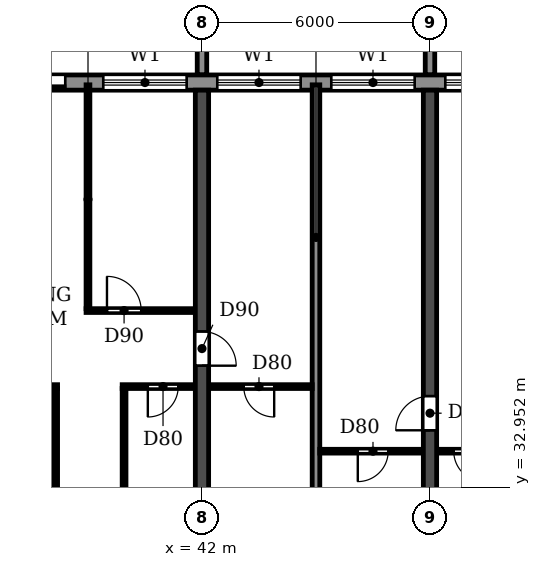
"""IFC4 building model, lengths in metres.
Left out: names, types, materials, properties, quantities, classifications, styles, units other than length and angle.
Written with IfcOpenShell. Run it as: python <this file> out.ifc"""

import sys

from ifc_helpers import new_model, si_unit, direction, frame, frame_2d, origin, place, context, subcontext, project, spatial, polyline, rectangle, outline, extrude, source, transform, mapped, element, fill, save


model = new_model("IFC4")
c1 = context("Model", 3, precision=1e-05, world=origin(), true_north=direction((0.0, 1.0)))
c2 = subcontext(c1, "Body", "Model", "MODEL_VIEW")
j1 = project(units=[si_unit("LENGTHUNIT", "METRE"), si_unit("PLANEANGLEUNIT", "RADIAN")], contexts=[c1])
p1 = place(None, origin())
s1 = spatial("IfcSite", under=j1, at=p1, CompositionType="ELEMENT")
p2 = place(p1, origin())
s2 = spatial("IfcBuilding", under=s1, at=p2, CompositionType="ELEMENT")
p3 = place(p2, frame((0.0, 0.0, 92.7)))
s3 = spatial("IfcBuildingStorey", under=s2, at=p3, CompositionType="ELEMENT", Elevation=92.7)
p4 = place(p3, frame((42.0, 30.525, 0.0), z_axis=(0.0, 0.0, 1.0), x_axis=(0.0, 1.0, 0.0)))
e1 = element("IfcWall", 1, at=p4, inside=s3, PredefinedType="SHEAR", context=c2, shape_type="SweptSolid", body=[
    extrude(rectangle(XDim=12.875, YDim=0.35, at=frame_2d((6.438, 0.0))), origin(), (0.0, 0.0, 1.0), 3.06),
])
p5 = place(p4, frame((5.625, 0.0, 0.0)))
e2 = element("IfcOpeningElement", 2, at=p5, cuts=e1, PredefinedType="OPENING", context=c2, shape_type="SweptSolid", body=[
    extrude(rectangle(XDim=0.9, YDim=2.1, at=frame_2d((0.45, 1.05))), frame((0.0, 0.185, 0.0), z_axis=(0.0, -1.0, 0.0), x_axis=(1.0, 0.0, 0.0)), (0.0, 0.0, 1.0), 0.37),
])
p6 = place(p3, frame((48.0, 30.525, 0.0), z_axis=(0.0, 0.0, 1.0), x_axis=(0.0, 1.0, 0.0)))
e3 = element("IfcWall", 3, at=p6, inside=s3, PredefinedType="SHEAR", context=c2, shape_type="SweptSolid", body=[
    extrude(rectangle(XDim=12.875, YDim=0.35, at=frame_2d((6.438, 0.0))), origin(), (0.0, 0.0, 1.0), 3.06),
])
p7 = place(p6, frame((3.925, 0.0, 0.0)))
e4 = element("IfcOpeningElement", 4, at=p7, cuts=e3, PredefinedType="OPENING", context=c2, shape_type="SweptSolid", body=[
    extrude(rectangle(XDim=0.9, YDim=2.1, at=frame_2d((0.45, 1.05))), frame((0.0, 0.185, 0.0), z_axis=(0.0, -1.0, 0.0), x_axis=(1.0, 0.0, 0.0)), (0.0, 0.0, 1.0), 0.37),
])
p8 = place(p3, frame((91.317, 43.6, 0.0), z_axis=(0.0, 0.0, 1.0), x_axis=(-1.0, 0.0, 0.0)))
e5 = element("IfcWall", 5, at=p8, inside=s3, PredefinedType="STANDARD", context=c2, shape_type="SweptSolid", body=[
    extrude(rectangle(XDim=80.634, YDim=0.4, at=frame_2d((40.317, 0.0))), origin(), (0.0, 0.0, 1.0), 3.06),
])
p9 = place(p8, frame((76.717, 0.0, 0.9)))
e6 = element("IfcOpeningElement", 6, at=p9, cuts=e5, PredefinedType="OPENING", context=c2, shape_type="SweptSolid", body=[
    extrude(rectangle(XDim=2.2, YDim=1.5, at=frame_2d((1.1, 0.75))), frame((0.0, 0.21, 0.0), z_axis=(0.0, -1.0, 0.0), x_axis=(1.0, 0.0, 0.0)), (0.0, 0.0, 1.0), 0.42),
])
p10 = place(p8, frame((73.917, 0.0, 0.0)))
e7 = element("IfcOpeningElement", 7, at=p10, cuts=e5, PredefinedType="OPENING", context=c2, shape_type="SweptSolid", body=[
    extrude(rectangle(XDim=1.8, YDim=2.4, at=frame_2d((0.9, 1.2))), frame((0.0, 0.21, 0.0), z_axis=(0.0, -1.0, 0.0), x_axis=(1.0, 0.0, 0.0)), (0.0, 0.0, 1.0), 0.42),
])
p11 = place(p8, frame((70.717, 0.0, 0.9)))
e8 = element("IfcOpeningElement", 8, at=p11, cuts=e5, PredefinedType="OPENING", context=c2, shape_type="SweptSolid", body=[
    extrude(rectangle(XDim=2.2, YDim=1.5, at=frame_2d((1.1, 0.75))), frame((0.0, 0.21, 0.0), z_axis=(0.0, -1.0, 0.0), x_axis=(1.0, 0.0, 0.0)), (0.0, 0.0, 1.0), 0.42),
])
p12 = place(p8, frame((67.717, 0.0, 0.9)))
e9 = element("IfcOpeningElement", 9, at=p12, cuts=e5, PredefinedType="OPENING", context=c2, shape_type="SweptSolid", body=[
    extrude(rectangle(XDim=2.2, YDim=1.5, at=frame_2d((1.1, 0.75))), frame((0.0, 0.21, 0.0), z_axis=(0.0, -1.0, 0.0), x_axis=(1.0, 0.0, 0.0)), (0.0, 0.0, 1.0), 0.42),
])
p13 = place(p8, frame((64.717, 0.0, 0.9)))
e10 = element("IfcOpeningElement", 10, at=p13, cuts=e5, PredefinedType="OPENING", context=c2, shape_type="SweptSolid", body=[
    extrude(rectangle(XDim=2.2, YDim=1.5, at=frame_2d((1.1, 0.75))), frame((0.0, 0.21, 0.0), z_axis=(0.0, -1.0, 0.0), x_axis=(1.0, 0.0, 0.0)), (0.0, 0.0, 1.0), 0.42),
])
p14 = place(p8, frame((61.917, 0.0, 0.0)))
e11 = element("IfcOpeningElement", 11, at=p14, cuts=e5, PredefinedType="OPENING", context=c2, shape_type="SweptSolid", body=[
    extrude(rectangle(XDim=1.8, YDim=2.4, at=frame_2d((0.9, 1.2))), frame((0.0, 0.21, 0.0), z_axis=(0.0, -1.0, 0.0), x_axis=(1.0, 0.0, 0.0)), (0.0, 0.0, 1.0), 0.42),
])
p15 = place(p8, frame((58.717, 0.0, 0.9)))
e12 = element("IfcOpeningElement", 12, at=p15, cuts=e5, PredefinedType="OPENING", context=c2, shape_type="SweptSolid", body=[
    extrude(rectangle(XDim=2.2, YDim=1.5, at=frame_2d((1.1, 0.75))), frame((0.0, 0.21, 0.0), z_axis=(0.0, -1.0, 0.0), x_axis=(1.0, 0.0, 0.0)), (0.0, 0.0, 1.0), 0.42),
])
p16 = place(p8, frame((55.717, 0.0, 0.9)))
e13 = element("IfcOpeningElement", 13, at=p16, cuts=e5, PredefinedType="OPENING", context=c2, shape_type="SweptSolid", body=[
    extrude(rectangle(XDim=2.2, YDim=1.5, at=frame_2d((1.1, 0.75))), frame((0.0, 0.21, 0.0), z_axis=(0.0, -1.0, 0.0), x_axis=(1.0, 0.0, 0.0)), (0.0, 0.0, 1.0), 0.42),
])
p17 = place(p8, frame((52.917, 0.0, 0.0)))
e14 = element("IfcOpeningElement", 14, at=p17, cuts=e5, PredefinedType="OPENING", context=c2, shape_type="SweptSolid", body=[
    extrude(rectangle(XDim=1.8, YDim=2.4, at=frame_2d((0.9, 1.2))), frame((0.0, 0.21, 0.0), z_axis=(0.0, -1.0, 0.0), x_axis=(1.0, 0.0, 0.0)), (0.0, 0.0, 1.0), 0.42),
])
p18 = place(p8, frame((49.717, 0.0, 0.9)))
e15 = element("IfcOpeningElement", 15, at=p18, cuts=e5, PredefinedType="OPENING", context=c2, shape_type="SweptSolid", body=[
    extrude(rectangle(XDim=2.2, YDim=1.5, at=frame_2d((1.1, 0.75))), frame((0.0, 0.21, 0.0), z_axis=(0.0, -1.0, 0.0), x_axis=(1.0, 0.0, 0.0)), (0.0, 0.0, 1.0), 0.42),
])
p19 = place(p8, frame((46.717, 0.0, 0.9)))
e16 = element("IfcOpeningElement", 16, at=p19, cuts=e5, PredefinedType="OPENING", context=c2, shape_type="SweptSolid", body=[
    extrude(rectangle(XDim=2.2, YDim=1.5, at=frame_2d((1.1, 0.75))), frame((0.0, 0.21, 0.0), z_axis=(0.0, -1.0, 0.0), x_axis=(1.0, 0.0, 0.0)), (0.0, 0.0, 1.0), 0.42),
])
p20 = place(p8, frame((43.717, 0.0, 0.9)))
e17 = element("IfcOpeningElement", 17, at=p20, cuts=e5, PredefinedType="OPENING", context=c2, shape_type="SweptSolid", body=[
    extrude(rectangle(XDim=2.2, YDim=1.5, at=frame_2d((1.1, 0.75))), frame((0.0, 0.21, 0.0), z_axis=(0.0, -1.0, 0.0), x_axis=(1.0, 0.0, 0.0)), (0.0, 0.0, 1.0), 0.42),
])
p21 = place(p8, frame((40.717, 0.0, 0.9)))
e18 = element("IfcOpeningElement", 18, at=p21, cuts=e5, PredefinedType="OPENING", context=c2, shape_type="SweptSolid", body=[
    extrude(rectangle(XDim=2.2, YDim=1.5, at=frame_2d((1.1, 0.75))), frame((0.0, 0.21, 0.0), z_axis=(0.0, -1.0, 0.0), x_axis=(1.0, 0.0, 0.0)), (0.0, 0.0, 1.0), 0.42),
])
p22 = place(p8, frame((37.917, 0.0, 0.0)))
e19 = element("IfcOpeningElement", 19, at=p22, cuts=e5, PredefinedType="OPENING", context=c2, shape_type="SweptSolid", body=[
    extrude(rectangle(XDim=1.8, YDim=2.4, at=frame_2d((0.9, 1.2))), frame((0.0, 0.21, 0.0), z_axis=(0.0, -1.0, 0.0), x_axis=(1.0, 0.0, 0.0)), (0.0, 0.0, 1.0), 0.42),
])
p23 = place(p8, frame((34.917, 0.0, 0.0)))
e20 = element("IfcOpeningElement", 20, at=p23, cuts=e5, PredefinedType="OPENING", context=c2, shape_type="SweptSolid", body=[
    extrude(rectangle(XDim=1.8, YDim=2.4, at=frame_2d((0.9, 1.2))), frame((0.0, 0.21, 0.0), z_axis=(0.0, -1.0, 0.0), x_axis=(1.0, 0.0, 0.0)), (0.0, 0.0, 1.0), 0.42),
])
p24 = place(p8, frame((31.717, 0.0, 0.9)))
e21 = element("IfcOpeningElement", 21, at=p24, cuts=e5, PredefinedType="OPENING", context=c2, shape_type="SweptSolid", body=[
    extrude(rectangle(XDim=2.2, YDim=1.5, at=frame_2d((1.1, 0.75))), frame((0.0, 0.21, 0.0), z_axis=(0.0, -1.0, 0.0), x_axis=(1.0, 0.0, 0.0)), (0.0, 0.0, 1.0), 0.42),
])
p25 = place(p8, frame((28.717, 0.0, 0.9)))
e22 = element("IfcOpeningElement", 22, at=p25, cuts=e5, PredefinedType="OPENING", context=c2, shape_type="SweptSolid", body=[
    extrude(rectangle(XDim=2.2, YDim=1.5, at=frame_2d((1.1, 0.75))), frame((0.0, 0.21, 0.0), z_axis=(0.0, -1.0, 0.0), x_axis=(1.0, 0.0, 0.0)), (0.0, 0.0, 1.0), 0.42),
])
p26 = place(p8, frame((25.717, 0.0, 0.9)))
e23 = element("IfcOpeningElement", 23, at=p26, cuts=e5, PredefinedType="OPENING", context=c2, shape_type="SweptSolid", body=[
    extrude(rectangle(XDim=2.2, YDim=1.5, at=frame_2d((1.1, 0.75))), frame((0.0, 0.21, 0.0), z_axis=(0.0, -1.0, 0.0), x_axis=(1.0, 0.0, 0.0)), (0.0, 0.0, 1.0), 0.42),
])
p27 = place(p8, frame((22.717, 0.0, 0.9)))
e24 = element("IfcOpeningElement", 24, at=p27, cuts=e5, PredefinedType="OPENING", context=c2, shape_type="SweptSolid", body=[
    extrude(rectangle(XDim=2.2, YDim=1.5, at=frame_2d((1.1, 0.75))), frame((0.0, 0.21, 0.0), z_axis=(0.0, -1.0, 0.0), x_axis=(1.0, 0.0, 0.0)), (0.0, 0.0, 1.0), 0.42),
])
p28 = place(p8, frame((19.917, 0.0, 0.0)))
e25 = element("IfcOpeningElement", 25, at=p28, cuts=e5, PredefinedType="OPENING", context=c2, shape_type="SweptSolid", body=[
    extrude(rectangle(XDim=1.8, YDim=2.4, at=frame_2d((0.9, 1.2))), frame((0.0, 0.21, 0.0), z_axis=(0.0, -1.0, 0.0), x_axis=(1.0, 0.0, 0.0)), (0.0, 0.0, 1.0), 0.42),
])
p29 = place(p8, frame((16.717, 0.0, 0.9)))
e26 = element("IfcOpeningElement", 26, at=p29, cuts=e5, PredefinedType="OPENING", context=c2, shape_type="SweptSolid", body=[
    extrude(rectangle(XDim=2.2, YDim=1.5, at=frame_2d((1.1, 0.75))), frame((0.0, 0.21, 0.0), z_axis=(0.0, -1.0, 0.0), x_axis=(1.0, 0.0, 0.0)), (0.0, 0.0, 1.0), 0.42),
])
p30 = place(p8, frame((13.917, 0.0, 0.0)))
e27 = element("IfcOpeningElement", 27, at=p30, cuts=e5, PredefinedType="OPENING", context=c2, shape_type="SweptSolid", body=[
    extrude(rectangle(XDim=1.8, YDim=2.4, at=frame_2d((0.9, 1.2))), frame((0.0, 0.21, 0.0), z_axis=(0.0, -1.0, 0.0), x_axis=(1.0, 0.0, 0.0)), (0.0, 0.0, 1.0), 0.42),
])
p31 = place(p8, frame((10.717, 0.0, 0.9)))
e28 = element("IfcOpeningElement", 28, at=p31, cuts=e5, PredefinedType="OPENING", context=c2, shape_type="SweptSolid", body=[
    extrude(rectangle(XDim=2.2, YDim=1.5, at=frame_2d((1.1, 0.75))), frame((0.0, 0.21, 0.0), z_axis=(0.0, -1.0, 0.0), x_axis=(1.0, 0.0, 0.0)), (0.0, 0.0, 1.0), 0.42),
])
p32 = place(p8, frame((7.917, 0.0, 0.0)))
e29 = element("IfcOpeningElement", 29, at=p32, cuts=e5, PredefinedType="OPENING", context=c2, shape_type="SweptSolid", body=[
    extrude(rectangle(XDim=1.8, YDim=2.4, at=frame_2d((0.9, 1.2))), frame((0.0, 0.21, 0.0), z_axis=(0.0, -1.0, 0.0), x_axis=(1.0, 0.0, 0.0)), (0.0, 0.0, 1.0), 0.42),
])
p33 = place(p8, frame((4.717, 0.0, 0.9)))
e30 = element("IfcOpeningElement", 30, at=p33, cuts=e5, PredefinedType="OPENING", context=c2, shape_type="SweptSolid", body=[
    extrude(rectangle(XDim=2.2, YDim=1.5, at=frame_2d((1.1, 0.75))), frame((0.0, 0.21, 0.0), z_axis=(0.0, -1.0, 0.0), x_axis=(1.0, 0.0, 0.0)), (0.0, 0.0, 1.0), 0.42),
])
p34 = place(p8, frame((1.917, 0.0, 0.0)))
e31 = element("IfcOpeningElement", 31, at=p34, cuts=e5, PredefinedType="OPENING", context=c2, shape_type="SweptSolid", body=[
    extrude(rectangle(XDim=1.8, YDim=2.4, at=frame_2d((0.9, 1.2))), frame((0.0, 0.21, 0.0), z_axis=(0.0, -1.0, 0.0), x_axis=(1.0, 0.0, 0.0)), (0.0, 0.0, 1.0), 0.42),
])
m1 = source(origin(), c2, "Body", "SweptSolid", [
    extrude(outline(polyline([(0.0, 0.0), (0.25, 0.0), (0.25, 3.1), (0.0, 3.1), (0.0, 0.0)])), origin(), (0.0, 0.0, 1.0), 3.1),
])
for number, where in (
    (32, (41.875, 43.8, 0.0)),
    (33, (47.875, 43.8, 0.0)),
):
    element("IfcWall", number, at=place(p3, frame(where)), inside=s3, PredefinedType="STANDARD", context=c2, shape_type="MappedRepresentation", body=[
        mapped(m1, transform((0.0, 0.0, 0.0))),
    ])
p35 = place(p3, frame((45.0, 30.535, 0.0), z_axis=(0.0, 0.0, 1.0), x_axis=(0.0, 1.0, 0.0)))
e34 = element("IfcWall", 34, at=p35, inside=s3, PredefinedType="PARTITIONING", context=c2, shape_type="SweptSolid", body=[
    extrude(rectangle(XDim=13.005, YDim=0.2, at=frame_2d((6.502, 0.0))), origin(), (0.0, 0.0, 1.0), 3.06),
])
p36 = place(p3, frame((45.1, 33.9, 0.0), z_axis=(0.0, 0.0, 1.0), x_axis=(1.0, 0.0, 0.0)))
e35 = element("IfcWall", 35, at=p36, inside=s3, PredefinedType="PARTITIONING", context=c2, shape_type="SweptSolid", body=[
    extrude(rectangle(XDim=2.715, YDim=0.1, at=frame_2d((1.357, 0.0))), origin(), (0.0, 0.0, 1.0), 3.06),
])
p37 = place(p36, frame((1.0, 0.0, 0.0)))
e36 = element("IfcOpeningElement", 36, at=p37, cuts=e35, PredefinedType="OPENING", context=c2, shape_type="SweptSolid", body=[
    extrude(rectangle(XDim=0.8, YDim=2.1, at=frame_2d((0.4, 1.05))), frame((0.0, 0.06, 0.0), z_axis=(0.0, -1.0, 0.0), x_axis=(1.0, 0.0, 0.0)), (0.0, 0.0, 1.0), 0.12),
])
p38 = place(p3, frame((48.185, 33.9, 0.0), z_axis=(0.0, 0.0, 1.0), x_axis=(1.0, 0.0, 0.0)))
e37 = element("IfcWall", 37, at=p38, inside=s3, PredefinedType="PARTITIONING", context=c2, shape_type="SweptSolid", body=[
    extrude(rectangle(XDim=1.915, YDim=0.1, at=frame_2d((0.958, 0.0))), origin(), (0.0, 0.0, 1.0), 3.06),
])
p39 = place(p38, frame((0.44, 0.0, 0.0)))
e38 = element("IfcOpeningElement", 38, at=p39, cuts=e37, PredefinedType="OPENING", context=c2, shape_type="SweptSolid", body=[
    extrude(rectangle(XDim=0.8, YDim=2.1, at=frame_2d((0.4, 1.05))), frame((0.0, 0.06, 0.0), z_axis=(0.0, -1.0, 0.0), x_axis=(1.0, 0.0, 0.0)), (0.0, 0.0, 1.0), 0.12),
])
p40 = place(p3, frame((36.185, 35.6, 0.0), z_axis=(0.0, 0.0, 1.0), x_axis=(1.0, 0.0, 0.0)))
e39 = element("IfcWall", 39, at=p40, inside=s3, PredefinedType="PARTITIONING", context=c2, shape_type="SweptSolid", body=[
    extrude(rectangle(XDim=2.015, YDim=0.1, at=frame_2d((1.007, 0.0))), origin(), (0.0, 0.0, 1.0), 3.06),
])
p41 = place(p40, frame((0.44, 0.0, 0.0)))
e40 = element("IfcOpeningElement", 40, at=p41, cuts=e39, PredefinedType="OPENING", context=c2, shape_type="SweptSolid", body=[
    extrude(rectangle(XDim=0.9, YDim=2.1, at=frame_2d((0.45, 1.05))), frame((0.0, 0.06, 0.0), z_axis=(0.0, -1.0, 0.0), x_axis=(1.0, 0.0, 0.0)), (0.0, 0.0, 1.0), 0.12),
])
p42 = place(p3, frame((39.9, 35.6, 0.0), z_axis=(0.0, 0.0, 1.0), x_axis=(1.0, 0.0, 0.0)))
e41 = element("IfcWall", 41, at=p42, inside=s3, PredefinedType="PARTITIONING", context=c2, shape_type="SweptSolid", body=[
    extrude(rectangle(XDim=1.915, YDim=0.1, at=frame_2d((0.958, 0.0))), origin(), (0.0, 0.0, 1.0), 3.06),
])
p43 = place(p42, frame((0.675, 0.0, 0.0)))
e42 = element("IfcOpeningElement", 42, at=p43, cuts=e41, PredefinedType="OPENING", context=c2, shape_type="SweptSolid", body=[
    extrude(rectangle(XDim=0.8, YDim=2.1, at=frame_2d((0.4, 1.05))), frame((0.0, 0.06, 0.0), z_axis=(0.0, -1.0, 0.0), x_axis=(1.0, 0.0, 0.0)), (0.0, 0.0, 1.0), 0.12),
])
p44 = place(p3, frame((42.185, 35.6, 0.0), z_axis=(0.0, 0.0, 1.0), x_axis=(1.0, 0.0, 0.0)))
e43 = element("IfcWall", 43, at=p44, inside=s3, PredefinedType="PARTITIONING", context=c2, shape_type="SweptSolid", body=[
    extrude(rectangle(XDim=2.715, YDim=0.1, at=frame_2d((1.357, 0.0))), origin(), (0.0, 0.0, 1.0), 3.06),
])
p45 = place(p44, frame((0.915, 0.0, 0.0)))
e44 = element("IfcOpeningElement", 44, at=p45, cuts=e43, PredefinedType="OPENING", context=c2, shape_type="SweptSolid", body=[
    extrude(rectangle(XDim=0.8, YDim=2.1, at=frame_2d((0.4, 1.05))), frame((0.0, 0.06, 0.0), z_axis=(0.0, -1.0, 0.0), x_axis=(1.0, 0.0, 0.0)), (0.0, 0.0, 1.0), 0.12),
])
p46 = place(p3, frame((38.95, 37.6, 0.0), z_axis=(0.0, 0.0, 1.0), x_axis=(1.0, 0.0, 0.0)))
e45 = element("IfcWall", 45, at=p46, inside=s3, PredefinedType="PARTITIONING", context=c2, shape_type="SweptSolid", body=[
    extrude(rectangle(XDim=2.865, YDim=0.1, at=frame_2d((1.433, 0.0))), origin(), (0.0, 0.0, 1.0), 3.06),
])
p47 = place(p46, frame((0.55, 0.0, 0.0)))
e46 = element("IfcOpeningElement", 46, at=p47, cuts=e45, PredefinedType="OPENING", context=c2, shape_type="SweptSolid", body=[
    extrude(rectangle(XDim=0.9, YDim=2.1, at=frame_2d((0.45, 1.05))), frame((0.0, 0.06, 0.0), z_axis=(0.0, -1.0, 0.0), x_axis=(1.0, 0.0, 0.0)), (0.0, 0.0, 1.0), 0.12),
])
p48 = place(p3, frame((38.15, 30.535, 0.0), z_axis=(0.0, 0.0, 1.0), x_axis=(0.0, 1.0, 0.0)))
e47 = element("IfcWall", 47, at=p48, inside=s3, PredefinedType="PARTITIONING", context=c2, shape_type="SweptSolid", body=[
    extrude(rectangle(XDim=5.015, YDim=0.1, at=frame_2d((2.508, 0.0))), origin(), (0.0, 0.0, 1.0), 3.06),
])
p49 = place(p3, frame((39.0, 37.65, 0.0), z_axis=(0.0, 0.0, 1.0), x_axis=(0.0, 1.0, 0.0)))
e48 = element("IfcWall", 48, at=p49, inside=s3, PredefinedType="PARTITIONING", context=c2, shape_type="SweptSolid", body=[
    extrude(rectangle(XDim=5.89, YDim=0.1, at=frame_2d((2.945, 0.0))), origin(), (0.0, 0.0, 1.0), 3.06),
])
p50 = place(p3, frame((39.95, 30.535, 0.0), z_axis=(0.0, 0.0, 1.0), x_axis=(0.0, 1.0, 0.0)))
e49 = element("IfcWall", 49, at=p50, inside=s3, PredefinedType="PARTITIONING", context=c2, shape_type="SweptSolid", body=[
    extrude(rectangle(XDim=5.015, YDim=0.1, at=frame_2d((2.508, 0.0))), origin(), (0.0, 0.0, 1.0), 3.06),
])
p51 = place(p17, origin())
e50 = element("IfcDoor", 50, at=p51, inside=s3, OperationType="DOUBLE_DOOR_SLIDING", PredefinedType="DOOR", context=c2, shape_type="SweptSolid", body=[
    extrude(rectangle(XDim=1.8, YDim=2.4, at=frame_2d((0.9, 1.2))), frame((0.0, 0.025, 0.0), z_axis=(0.0, -1.0, 0.0), x_axis=(1.0, 0.0, 0.0)), (0.0, 0.0, 1.0), 0.05),
])
fill(e14, e50)
p52 = place(p18, origin())
e51 = element("IfcWindow", 51, at=p52, inside=s3, PartitioningType="DOUBLE_PANEL_HORIZONTAL", PredefinedType="WINDOW", context=c2, shape_type="SweptSolid", body=[
    extrude(rectangle(XDim=2.2, YDim=1.5, at=frame_2d((1.1, 0.75))), frame((0.0, 0.03, 0.0), z_axis=(0.0, -1.0, 0.0), x_axis=(1.0, 0.0, 0.0)), (0.0, 0.0, 1.0), 0.06),
])
fill(e15, e51)
p53 = place(p19, origin())
e52 = element("IfcWindow", 52, at=p53, inside=s3, PartitioningType="DOUBLE_PANEL_HORIZONTAL", PredefinedType="WINDOW", context=c2, shape_type="SweptSolid", body=[
    extrude(rectangle(XDim=2.2, YDim=1.5, at=frame_2d((1.1, 0.75))), frame((0.0, 0.03, 0.0), z_axis=(0.0, -1.0, 0.0), x_axis=(1.0, 0.0, 0.0)), (0.0, 0.0, 1.0), 0.06),
])
fill(e16, e52)
p54 = place(p20, origin())
e53 = element("IfcWindow", 53, at=p54, inside=s3, PartitioningType="DOUBLE_PANEL_HORIZONTAL", PredefinedType="WINDOW", context=c2, shape_type="SweptSolid", body=[
    extrude(rectangle(XDim=2.2, YDim=1.5, at=frame_2d((1.1, 0.75))), frame((0.0, 0.03, 0.0), z_axis=(0.0, -1.0, 0.0), x_axis=(1.0, 0.0, 0.0)), (0.0, 0.0, 1.0), 0.06),
])
fill(e17, e53)
p55 = place(p21, origin())
e54 = element("IfcWindow", 54, at=p55, inside=s3, PartitioningType="DOUBLE_PANEL_HORIZONTAL", PredefinedType="WINDOW", context=c2, shape_type="SweptSolid", body=[
    extrude(rectangle(XDim=2.2, YDim=1.5, at=frame_2d((1.1, 0.75))), frame((0.0, 0.03, 0.0), z_axis=(0.0, -1.0, 0.0), x_axis=(1.0, 0.0, 0.0)), (0.0, 0.0, 1.0), 0.06),
])
fill(e18, e54)
p56 = place(p45, frame((0.8, 0.0, 0.0), z_axis=(0.0, 0.0, 1.0), x_axis=(-1.0, 0.0, 0.0)))
e55 = element("IfcDoor", 55, at=p56, inside=s3, OperationType="SINGLE_SWING_LEFT", PredefinedType="DOOR", context=c2, shape_type="SweptSolid", body=[
    extrude(rectangle(XDim=0.8, YDim=2.1, at=frame_2d((0.4, 1.05))), frame((0.0, 0.025, 0.0), z_axis=(0.0, -1.0, 0.0), x_axis=(1.0, 0.0, 0.0)), (0.0, 0.0, 1.0), 0.05),
])
fill(e44, e55)
p57 = place(p47, origin())
e56 = element("IfcDoor", 56, at=p57, inside=s3, OperationType="SINGLE_SWING_LEFT", PredefinedType="DOOR", context=c2, shape_type="SweptSolid", body=[
    extrude(rectangle(XDim=0.9, YDim=2.1, at=frame_2d((0.45, 1.05))), frame((0.0, 0.025, 0.0), z_axis=(0.0, -1.0, 0.0), x_axis=(1.0, 0.0, 0.0)), (0.0, 0.0, 1.0), 0.05),
])
fill(e46, e56)
p58 = place(p43, frame((0.8, 0.0, 0.0), z_axis=(0.0, 0.0, 1.0), x_axis=(-1.0, 0.0, 0.0)))
e57 = element("IfcDoor", 57, at=p58, inside=s3, OperationType="SINGLE_SWING_RIGHT", PredefinedType="DOOR", context=c2, shape_type="SweptSolid", body=[
    extrude(rectangle(XDim=0.8, YDim=2.1, at=frame_2d((0.4, 1.05))), frame((0.0, 0.025, 0.0), z_axis=(0.0, -1.0, 0.0), x_axis=(1.0, 0.0, 0.0)), (0.0, 0.0, 1.0), 0.05),
])
fill(e42, e57)
p59 = place(p5, frame((0.9, 0.0, 0.0), z_axis=(0.0, 0.0, 1.0), x_axis=(-1.0, 0.0, 0.0)))
e58 = element("IfcDoor", 58, at=p59, inside=s3, OperationType="SINGLE_SWING_RIGHT", PredefinedType="DOOR", context=c2, shape_type="SweptSolid", body=[
    extrude(rectangle(XDim=0.9, YDim=2.1, at=frame_2d((0.45, 1.05))), frame((0.0, 0.025, 0.0), z_axis=(0.0, -1.0, 0.0), x_axis=(1.0, 0.0, 0.0)), (0.0, 0.0, 1.0), 0.05),
])
fill(e2, e58)
p60 = place(p37, frame((0.8, 0.0, 0.0), z_axis=(0.0, 0.0, 1.0), x_axis=(-1.0, 0.0, 0.0)))
e59 = element("IfcDoor", 59, at=p60, inside=s3, OperationType="SINGLE_SWING_RIGHT", PredefinedType="DOOR", context=c2, shape_type="SweptSolid", body=[
    extrude(rectangle(XDim=0.8, YDim=2.1, at=frame_2d((0.4, 1.05))), frame((0.0, 0.025, 0.0), z_axis=(0.0, -1.0, 0.0), x_axis=(1.0, 0.0, 0.0)), (0.0, 0.0, 1.0), 0.05),
])
fill(e36, e59)
p61 = place(p7, origin())
e60 = element("IfcDoor", 60, at=p61, inside=s3, OperationType="SINGLE_SWING_LEFT", PredefinedType="DOOR", context=c2, shape_type="SweptSolid", body=[
    extrude(rectangle(XDim=0.9, YDim=2.1, at=frame_2d((0.45, 1.05))), frame((0.0, 0.025, 0.0), z_axis=(0.0, -1.0, 0.0), x_axis=(1.0, 0.0, 0.0)), (0.0, 0.0, 1.0), 0.05),
])
fill(e4, e60)
p62 = place(p39, frame((0.8, 0.0, 0.0), z_axis=(0.0, 0.0, 1.0), x_axis=(-1.0, 0.0, 0.0)))
e61 = element("IfcDoor", 61, at=p62, inside=s3, OperationType="SINGLE_SWING_LEFT", PredefinedType="DOOR", context=c2, shape_type="SweptSolid", body=[
    extrude(rectangle(XDim=0.8, YDim=2.1, at=frame_2d((0.4, 1.05))), frame((0.0, 0.025, 0.0), z_axis=(0.0, -1.0, 0.0), x_axis=(1.0, 0.0, 0.0)), (0.0, 0.0, 1.0), 0.05),
])
fill(e38, e61)
save(model, sys.argv[1])
